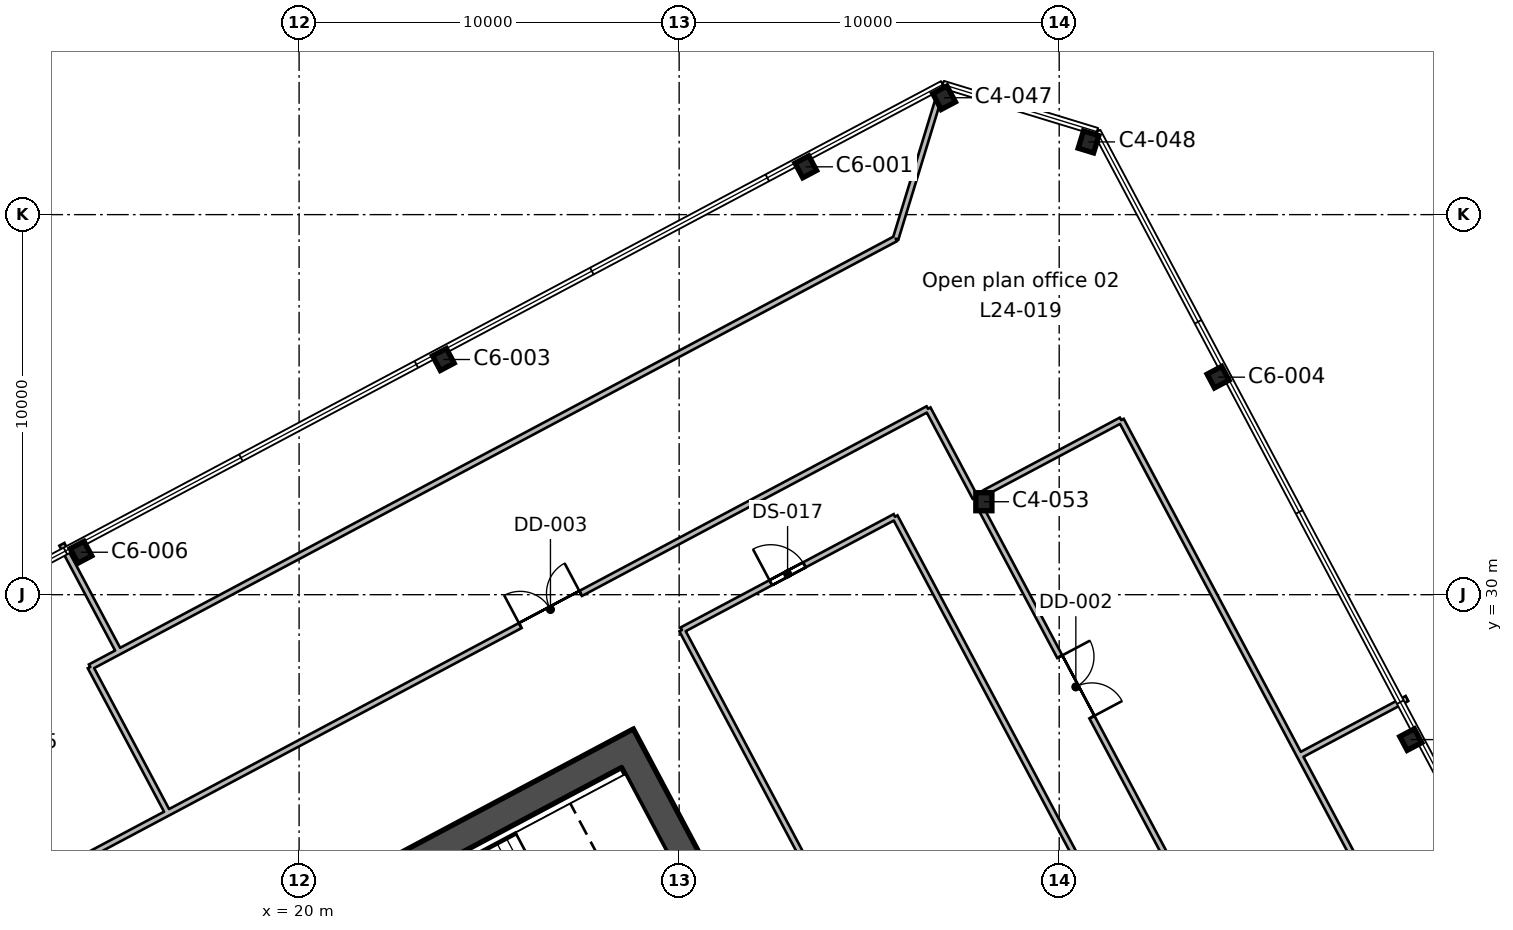
"""IFC4 building model, lengths in metres.
Left out: names, types, materials, properties, quantities, classifications, styles, units other than length and angle.
Written with IfcOpenShell. Run it as: python <this file> out.ifc"""

import sys

from ifc_helpers import new_model, si_unit, direction, frame, frame_2d, origin, origin_2d, place, context, subcontext, project, spatial, rectangle, i_section, extrude, element, fill, save


model = new_model("IFC4")
c1 = context("Model", 3, precision=1e-05, world=origin(), true_north=direction((0.0, 1.0)))
c2 = subcontext(c1, "Body", "Model", "MODEL_VIEW")
j1 = project(units=[si_unit("LENGTHUNIT", "METRE"), si_unit("PLANEANGLEUNIT", "RADIAN")], contexts=[c1])
p1 = place(None, origin())
s1 = spatial("IfcSite", under=j1, at=p1, CompositionType="ELEMENT")
p2 = place(p1, origin())
s2 = spatial("IfcBuilding", under=s1, at=p2, CompositionType="ELEMENT")
p3 = place(p2, frame((0.0, 0.0, 122.2)))
s3 = spatial("IfcBuildingStorey", under=s2, at=p3, CompositionType="ELEMENT", Elevation=122.2)
for number, where, z_axis, x_axis in (
    (1, (49.251, 26.187, 0.0), (0.0, 0.0, 1.0), (-0.469, 0.883, 0.0)),
    (2, (14.261, 31.117, 0.0), (0.0, 0.0, 1.0), (-0.883, -0.469, 0.0)),
):
    element("IfcColumn", number, at=place(p3, frame(where, z_axis=z_axis, x_axis=x_axis)), inside=s3, PredefinedType="COLUMN", context=c2, shape_type="SweptSolid", body=[
        extrude(i_section(OverallWidth=0.412, OverallDepth=0.434, WebThickness=0.036, FlangeThickness=0.057, FilletRadius=0.015, at=origin_2d()), origin(), (0.0, 0.0, 1.0), 4.0),
    ])
p4 = place(p3, frame((38.018, 32.446, 0.0), z_axis=(0.0, 0.0, 1.0), x_axis=(1.0, 0.0, 0.0)))
e3 = element("IfcColumn", 3, at=p4, inside=s3, PredefinedType="COLUMN", context=c2, shape_type="SweptSolid", body=[
    extrude(i_section(OverallWidth=0.424, OverallDepth=0.475, WebThickness=0.048, FlangeThickness=0.077, FilletRadius=0.015, at=origin_2d()), origin(), (0.0, 0.0, 1.0), 4.0),
])
for number, where, z_axis, x_axis in (
    (4, (44.181, 35.723, 0.0), (0.0, 0.0, 1.0), (-0.469, 0.883, 0.0)),
    (5, (23.796, 36.188, 0.0), (0.0, 0.0, 1.0), (-0.883, -0.469, 0.0)),
    (6, (33.332, 41.258, 0.0), (0.0, 0.0, 1.0), (-0.883, -0.469, 0.0)),
):
    element("IfcColumn", number, at=place(p3, frame(where, z_axis=z_axis, x_axis=x_axis)), inside=s3, PredefinedType="COLUMN", context=c2, shape_type="SweptSolid", body=[
        extrude(i_section(OverallWidth=0.412, OverallDepth=0.434, WebThickness=0.036, FlangeThickness=0.057, FilletRadius=0.015, at=origin_2d()), origin(), (0.0, 0.0, 1.0), 4.0),
    ])
for number, where, z_axis, x_axis in (
    (7, (40.772, 41.913, 0.0), (0.0, 0.0, 1.0), (-0.956, 0.292, 0.0)),
    (8, (36.971, 43.076, 0.0), (0.0, 0.0, 1.0), (-0.883, -0.469, 0.0)),
):
    element("IfcColumn", number, at=place(p3, frame(where, z_axis=z_axis, x_axis=x_axis)), inside=s3, PredefinedType="COLUMN", context=c2, shape_type="SweptSolid", body=[
        extrude(i_section(OverallWidth=0.424, OverallDepth=0.475, WebThickness=0.048, FlangeThickness=0.077, FilletRadius=0.015, at=origin_2d()), origin(), (0.0, 0.0, 1.0), 4.0),
    ])
p5 = place(p3, frame((37.713, 8.896, 0.0), z_axis=(0.0, 0.0, 1.0), x_axis=(-0.469469918705, 0.88294846703, 0.0)))
e9 = element("IfcWall", 9, at=p5, inside=s3, PredefinedType="SHEAR", context=c2, shape_type="SweptSolid", body=[
    extrude(rectangle(XDim=19.7, YDim=0.75, at=frame_2d((9.85, 0.0))), origin(), (0.0, 0.0, 1.0), 4.0),
])
p6 = place(p5, frame((10.45, 0.0, 0.0)))
e10 = element("IfcOpeningElement", 10, at=p6, cuts=e9, PredefinedType="OPENING", context=c2, shape_type="SweptSolid", body=[
    extrude(rectangle(XDim=2.4, YDim=2.4, at=frame_2d((1.2, 1.2))), frame((0.0, 0.385, 0.0), z_axis=(0.0, -1.0, 0.0), x_axis=(1.0, 0.0, 0.0)), (0.0, 0.0, 1.0), 0.77),
])
p7 = place(p3, frame((10.474, 16.3, 0.0), z_axis=(0.0, 0.0, 1.0), x_axis=(0.88295010195, 0.469466843842, 0.0)))
e11 = element("IfcWall", 11, at=p7, inside=s3, PredefinedType="SHEAR", context=c2, shape_type="SweptSolid", body=[
    extrude(rectangle(XDim=20.2, YDim=0.75, at=frame_2d((10.1, 0.0))), origin(), (0.0, 0.0, 1.0), 4.0),
])
p8 = place(p3, frame((0.0, 15.46, 0.0), z_axis=(0.0, 0.0, 1.0), x_axis=(0.882952116052, 0.469463055798, 0.0)))
e12 = element("IfcWall", 12, at=p8, inside=s3, PredefinedType="PARTITIONING", context=c2, shape_type="SweptSolid", body=[
    extrude(rectangle(XDim=18.96, YDim=0.15, at=frame_2d((9.48, 0.0))), origin(), (0.0, 0.0, 1.0), 3.64),
])
p9 = place(p8, frame((9.35, 0.0, 0.0)))
e13 = element("IfcOpeningElement", 13, at=p9, cuts=e12, PredefinedType="OPENING", context=c2, shape_type="SweptSolid", body=[
    extrude(rectangle(XDim=1.0, YDim=2.1, at=frame_2d((0.5, 1.05))), frame((0.0, 0.085, 0.0), z_axis=(0.0, -1.0, 0.0), x_axis=(1.0, 0.0, 0.0)), (0.0, 0.0, 1.0), 0.17),
])
p10 = place(p8, frame((7.7, 0.0, 0.0)))
e14 = element("IfcOpeningElement", 14, at=p10, cuts=e12, PredefinedType="OPENING", context=c2, shape_type="SweptSolid", body=[
    extrude(rectangle(XDim=1.0, YDim=2.1, at=frame_2d((0.5, 1.05))), frame((0.0, 0.085, 0.0), z_axis=(0.0, -1.0, 0.0), x_axis=(1.0, 0.0, 0.0)), (0.0, 0.0, 1.0), 0.17),
])
p11 = place(p3, frame((15.761, 25.739, 0.0), z_axis=(0.0, 0.0, 1.0), x_axis=(0.469318416257, -0.883029005278, 0.0)))
e15 = element("IfcWall", 15, at=p11, inside=s3, PredefinedType="PARTITIONING", context=c2, shape_type="SweptSolid", body=[
    extrude(rectangle(XDim=1.677, YDim=0.15, at=frame_2d((0.839, 0.0))), origin(), (0.0, 0.0, 1.0), 3.64),
])
p12 = place(p3, frame((13.757, 31.325, 0.0), z_axis=(0.0, 0.0, 1.0), x_axis=(0.469685095616, -0.882834022315, 0.0)))
e16 = element("IfcWall", 16, at=p12, inside=s3, PredefinedType="PARTITIONING", context=c2, shape_type="SweptSolid", body=[
    extrude(rectangle(XDim=3.2, YDim=0.15, at=frame_2d((1.6, 0.0))), origin(), (0.0, 0.0, 1.0), 3.64),
])
p13 = place(p3, frame((15.258, 28.499, 0.0), z_axis=(0.0, 0.0, 1.0), x_axis=(0.882941691772, 0.469482660948, 0.0)))
e17 = element("IfcWall", 17, at=p13, inside=s3, PredefinedType="PARTITIONING", context=c2, shape_type="SweptSolid", body=[
    extrude(rectangle(XDim=23.149, YDim=0.15, at=frame_2d((11.574, 0.0))), origin(), (0.0, 0.0, 1.0), 3.64),
])
p14 = place(p3, frame((35.697, 39.367, 0.0), z_axis=(0.0, 0.0, 1.0), x_axis=(0.292517637823, 0.956260127561, 0.0)))
e18 = element("IfcWall", 18, at=p14, inside=s3, PredefinedType="PARTITIONING", context=c2, shape_type="SweptSolid", body=[
    extrude(rectangle(XDim=3.753, YDim=0.15, at=frame_2d((1.876, 0.0))), origin(), (0.0, 0.0, 1.0), 3.64),
])
p15 = place(p3, frame((15.761, 25.739, 0.0), z_axis=(0.0, 0.0, 1.0), x_axis=(-0.469469065188, 0.882948920851, 0.0)))
e19 = element("IfcWall", 19, at=p15, inside=s3, PredefinedType="PARTITIONING", context=c2, shape_type="SweptSolid", body=[
    extrude(rectangle(XDim=2.673, YDim=0.15, at=frame_2d((1.336, 0.0))), origin(), (0.0, 0.0, 1.0), 3.64),
])
p16 = place(p3, frame((14.506, 28.099, 0.0), z_axis=(0.0, 0.0, 1.0), x_axis=(0.882907789101, 0.469546415113, 0.0)))
e20 = element("IfcWall", 20, at=p16, inside=s3, PredefinedType="PARTITIONING", context=c2, shape_type="SweptSolid", body=[
    extrude(rectangle(XDim=0.852, YDim=0.15, at=frame_2d((0.426, 0.0))), origin(), (0.0, 0.0, 1.0), 3.64),
])
p17 = place(p3, frame((37.789, 32.557, 0.0), z_axis=(0.0, 0.0, 1.0), x_axis=(-0.469557862383, 0.882901701139, 0.0)))
e21 = element("IfcWall", 21, at=p17, inside=s3, PredefinedType="PARTITIONING", context=c2, shape_type="SweptSolid", body=[
    extrude(rectangle(XDim=2.645, YDim=0.15, at=frame_2d((1.323, 0.0))), origin(), (0.0, 0.0, 1.0), 3.64),
])
p18 = place(p3, frame((36.547, 34.892, 0.0), z_axis=(0.0, 0.0, 1.0), x_axis=(-0.882949665217, -0.469467665226, 0.0)))
e22 = element("IfcWall", 22, at=p18, inside=s3, PredefinedType="PARTITIONING", context=c2, shape_type="SweptSolid", body=[
    extrude(rectangle(XDim=22.432, YDim=0.15, at=frame_2d((11.216, 0.0))), origin(), (0.0, 0.0, 1.0), 3.64),
])
p19 = place(p18, frame((10.35, 0.0, 0.0)))
e23 = element("IfcOpeningElement", 23, at=p19, cuts=e22, PredefinedType="OPENING", context=c2, shape_type="SweptSolid", body=[
    extrude(rectangle(XDim=1.8, YDim=2.1, at=frame_2d((0.9, 1.05))), frame((0.0, 0.085, 0.0), z_axis=(0.0, -1.0, 0.0), x_axis=(1.0, 0.0, 0.0)), (0.0, 0.0, 1.0), 0.17),
])
p20 = place(p3, frame((46.081, 26.226, 0.0), z_axis=(0.0, 0.0, 1.0), x_axis=(-0.469444635522, 0.882961909812, 0.0)))
e24 = element("IfcWall", 24, at=p20, inside=s3, PredefinedType="PARTITIONING", context=c2, shape_type="SweptSolid", body=[
    extrude(rectangle(XDim=9.477, YDim=0.15, at=frame_2d((4.739, 0.0))), origin(), (0.0, 0.0, 1.0), 3.64),
])
p21 = place(p3, frame((41.632, 34.594, 0.0), z_axis=(0.0, 0.0, 1.0), x_axis=(-0.88295491585, -0.469457789984, 0.0)))
e25 = element("IfcWall", 25, at=p21, inside=s3, PredefinedType="PARTITIONING", context=c2, shape_type="SweptSolid", body=[
    extrude(rectangle(XDim=4.07, YDim=0.15, at=frame_2d((2.035, 0.0))), origin(), (0.0, 0.0, 1.0), 3.64),
])
p22 = place(p3, frame((37.973, 32.209, 0.0), z_axis=(0.0, 0.0, 1.0), x_axis=(0.469526119231, -0.88291858252, 0.0)))
e26 = element("IfcWall", 26, at=p22, inside=s3, PredefinedType="PARTITIONING", context=c2, shape_type="SweptSolid", body=[
    extrude(rectangle(XDim=10.443, YDim=0.15, at=frame_2d((5.221, 0.0))), origin(), (0.0, 0.0, 1.0), 3.64),
])
p23 = place(p22, frame((4.35, 0.0, 0.0)))
e27 = element("IfcOpeningElement", 27, at=p23, cuts=e26, PredefinedType="OPENING", context=c2, shape_type="SweptSolid", body=[
    extrude(rectangle(XDim=1.8, YDim=2.1, at=frame_2d((0.9, 1.05))), frame((0.0, 0.085, 0.0), z_axis=(0.0, -1.0, 0.0), x_axis=(1.0, 0.0, 0.0)), (0.0, 0.0, 1.0), 0.17),
])
p24 = place(p3, frame((46.081, 26.226, 0.0), z_axis=(0.0, 0.0, 1.0), x_axis=(0.469497962096, -0.88293355559, 0.0)))
e28 = element("IfcWall", 28, at=p24, inside=s3, PredefinedType="PARTITIONING", context=c2, shape_type="SweptSolid", body=[
    extrude(rectangle(XDim=20.032, YDim=0.15, at=frame_2d((10.016, 0.0))), origin(), (0.0, 0.0, 1.0), 3.64),
])
p25 = place(p3, frame((49.152, 27.268, 0.0), z_axis=(0.0, 0.0, 1.0), x_axis=(-0.882819217955, -0.469712921271, 0.0)))
e29 = element("IfcWall", 29, at=p25, inside=s3, PredefinedType="PARTITIONING", context=c2, shape_type="SweptSolid", body=[
    extrude(rectangle(XDim=3.2, YDim=0.15, at=frame_2d((1.6, 0.0))), origin(), (0.0, 0.0, 1.0), 3.64),
])
p26 = place(p3, frame((30.072, 29.071, 0.0), z_axis=(0.0, 0.0, 1.0), x_axis=(0.882967334814, 0.469434431685, 0.0)))
e30 = element("IfcWall", 30, at=p26, inside=s3, PredefinedType="PARTITIONING", context=c2, shape_type="SweptSolid", body=[
    extrude(rectangle(XDim=6.35, YDim=0.15, at=frame_2d((3.175, 0.0))), origin(), (0.0, 0.0, 1.0), 3.64),
])
p27 = place(p26, frame((2.65, 0.0, 0.0)))
e31 = element("IfcOpeningElement", 31, at=p27, cuts=e30, PredefinedType="OPENING", context=c2, shape_type="SweptSolid", body=[
    extrude(rectangle(XDim=1.0, YDim=2.1, at=frame_2d((0.5, 1.05))), frame((0.0, 0.085, 0.0), z_axis=(0.0, -1.0, 0.0), x_axis=(1.0, 0.0, 0.0)), (0.0, 0.0, 1.0), 0.17),
])
p28 = place(p3, frame((35.679, 32.052, 0.0), z_axis=(0.0, 0.0, 1.0), x_axis=(0.469483439962, -0.88294127755, 0.0)))
e32 = element("IfcWall", 32, at=p28, inside=s3, PredefinedType="PARTITIONING", context=c2, shape_type="SweptSolid", body=[
    extrude(rectangle(XDim=21.1, YDim=0.15, at=frame_2d((10.55, 0.0))), origin(), (0.0, 0.0, 1.0), 3.64),
])
p29 = place(p3, frame((39.978, 10.441, 0.0), z_axis=(0.0, 0.0, 1.0), x_axis=(-0.469478643621, 0.882943827876, 0.0)))
e33 = element("IfcWall", 33, at=p29, inside=s3, PredefinedType="PARTITIONING", context=c2, shape_type="SweptSolid", body=[
    extrude(rectangle(XDim=21.1, YDim=0.15, at=frame_2d((10.55, 0.0))), origin(), (0.0, 0.0, 1.0), 3.64),
])
p30 = place(p23, origin())
e34 = element("IfcDoor", 34, at=p30, inside=s3, OperationType="DOUBLE_DOOR_SINGLE_SWING", PredefinedType="DOOR", context=c2, shape_type="SweptSolid", body=[
    extrude(rectangle(XDim=1.8, YDim=2.1, at=frame_2d((0.9, 1.05))), frame((0.0, 0.025, 0.0), z_axis=(0.0, -1.0, 0.0), x_axis=(1.0, 0.0, 0.0)), (0.0, 0.0, 1.0), 0.05),
])
fill(e27, e34)
p31 = place(p19, frame((1.8, 0.0, 0.0), z_axis=(0.0, 0.0, 1.0), x_axis=(-1.0, 0.0, 0.0)))
e35 = element("IfcDoor", 35, at=p31, inside=s3, OperationType="DOUBLE_DOOR_SINGLE_SWING", PredefinedType="DOOR", context=c2, shape_type="SweptSolid", body=[
    extrude(rectangle(XDim=1.8, YDim=2.1, at=frame_2d((0.9, 1.05))), frame((0.0, 0.025, 0.0), z_axis=(0.0, -1.0, 0.0), x_axis=(1.0, 0.0, 0.0)), (0.0, 0.0, 1.0), 0.05),
])
fill(e23, e35)
p32 = place(p27, origin())
e36 = element("IfcDoor", 36, at=p32, inside=s3, OperationType="SINGLE_SWING_LEFT", PredefinedType="DOOR", context=c2, shape_type="SweptSolid", body=[
    extrude(rectangle(XDim=1.0, YDim=2.1, at=frame_2d((0.5, 1.05))), frame((0.0, 0.025, 0.0), z_axis=(0.0, -1.0, 0.0), x_axis=(1.0, 0.0, 0.0)), (0.0, 0.0, 1.0), 0.05),
])
fill(e31, e36)
save(model, sys.argv[1])
